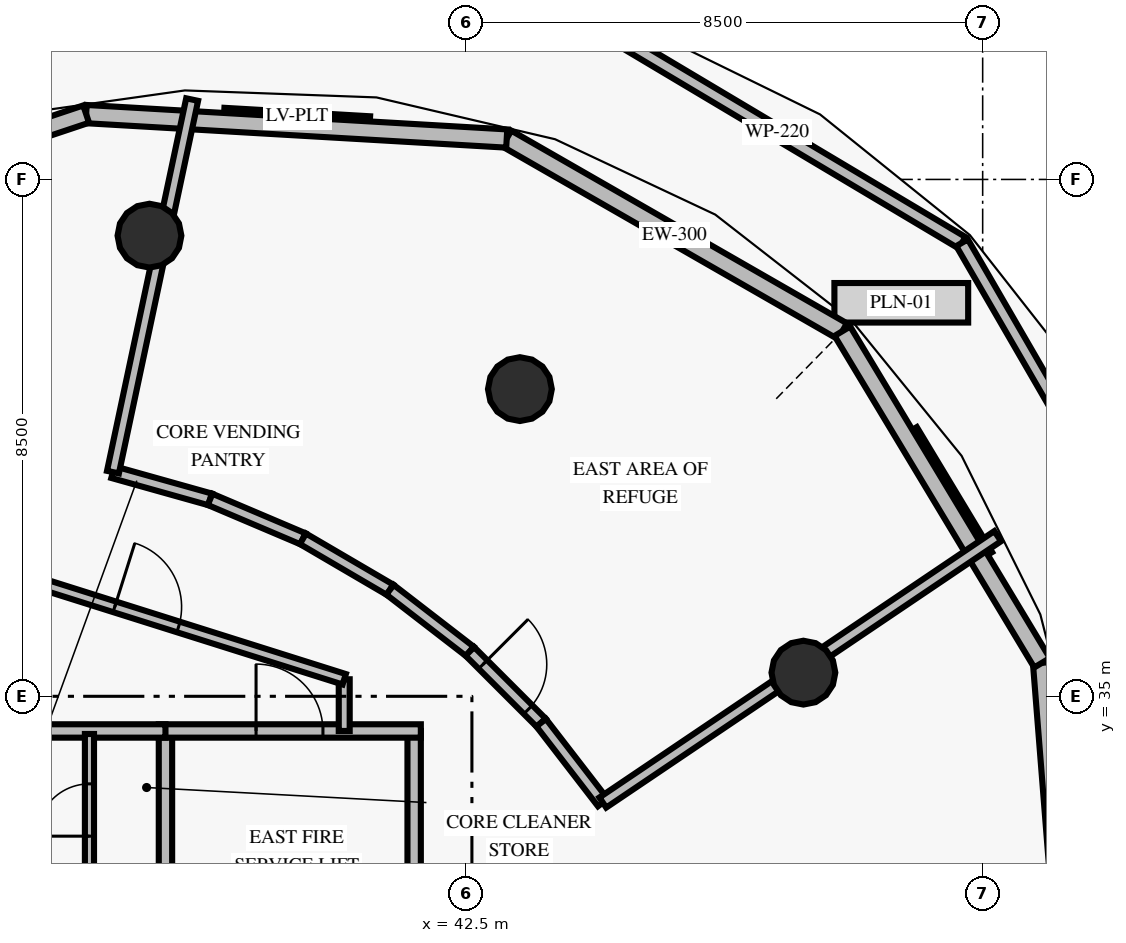
"""IFC4 building model, lengths in metres.
Left out: names, types, materials, properties, quantities, classifications, styles, units other than length and angle.
Written with IfcOpenShell. Run it as: python <this file> out.ifc"""

import sys

from ifc_helpers import new_model, si_unit, direction, frame, frame_2d, origin, origin_2d, place, context, subcontext, project, spatial, rectangle, circle, extrude, element, fill, save


model = new_model("IFC4")
c1 = context("Model", 3, precision=1e-05, world=origin(), true_north=direction((0.0, 1.0)))
c2 = subcontext(c1, "Body", "Model", "MODEL_VIEW")
j1 = project(units=[si_unit("LENGTHUNIT", "METRE"), si_unit("PLANEANGLEUNIT", "RADIAN")], contexts=[c1])
p1 = place(None, origin())
s1 = spatial("IfcSite", under=j1, at=p1, CompositionType="ELEMENT")
p2 = place(p1, origin())
s2 = spatial("IfcBuilding", under=s1, at=p2, CompositionType="ELEMENT")
p3 = place(p2, frame((0.0, 0.0, 220.4)))
s3 = spatial("IfcBuildingStorey", under=s2, at=p3, CompositionType="ELEMENT", Elevation=220.4)
for number, where, z_axis, x_axis in (
    (1, (48.052, 35.389, 0.0), (0.0, 0.0, 1.0), (1.0, 0.0, 0.0)),
    (2, (43.389, 40.052, 0.0), (0.0, 0.0, 1.0), (1.0, 0.0, 0.0)),
    (3, (37.297, 42.575, 0.0), (0.0, 0.0, 1.0), (1.0, 0.0, 0.0)),
):
    element("IfcColumn", number, at=place(p3, frame(where, z_axis=z_axis, x_axis=x_axis)), inside=s3, PredefinedType="COLUMN", context=c2, shape_type="SweptSolid", body=[
        extrude(circle(Radius=0.525, at=origin_2d()), origin(), (0.0, 0.0, 1.0), 5.0),
    ])
p4 = place(p3, frame((50.661, 42.459, 0.0), z_axis=(0.0, 0.0, 1.0), x_axis=(-0.859169548372, 0.511691007494, 0.0)))
e4 = element("IfcWall", 4, at=p4, inside=s3, PredefinedType="PARAPET", context=c2, shape_type="SweptSolid", body=[
    extrude(rectangle(XDim=7.086, YDim=0.22, at=frame_2d((3.543, 0.0))), origin(), (0.0, 0.0, 1.0), 1.2),
])
p5 = place(p3, frame((36.876, 46.653, 0.0), z_axis=(0.0, 0.0, 1.0), x_axis=(-0.953341950879, -0.301892571445, 0.0)))
e5 = element("IfcWall", 5, at=p5, inside=s3, PredefinedType="PARAPET", context=c2, shape_type="SweptSolid", body=[
    extrude(rectangle(XDim=8.533, YDim=0.22, at=frame_2d((4.267, 0.0))), origin(), (0.0, 0.0, 1.0), 1.2),
])
p6 = place(p3, frame((54.212, 36.327, 0.0), z_axis=(0.0, 0.0, 1.0), x_axis=(-0.50115850473, 0.865355506793, 0.0)))
e6 = element("IfcWall", 6, at=p6, inside=s3, PredefinedType="PARAPET", context=c2, shape_type="SweptSolid", body=[
    extrude(rectangle(XDim=7.086, YDim=0.22, at=frame_2d((3.543, 0.0))), origin(), (0.0, 0.0, 1.0), 1.2),
])
p7 = place(p3, frame((48.693, 41.004, 0.0), z_axis=(0.0, 0.0, 1.0), x_axis=(-0.867276097865, 0.497827450099, 0.0)))
e7 = element("IfcWall", 7, at=p7, inside=s3, PredefinedType="SOLIDWALL", context=c2, shape_type="SweptSolid", body=[
    extrude(rectangle(XDim=6.365, YDim=0.3, at=frame_2d((3.183, 0.0))), origin(), (0.0, 0.0, 1.0), 3.96),
])
p8 = place(p3, frame((43.173, 44.173, 0.0), z_axis=(0.0, 0.0, 1.0), x_axis=(-0.998314597189, 0.058034171311, 0.0)))
e8 = element("IfcWall", 8, at=p8, inside=s3, PredefinedType="SOLIDWALL", context=c2, shape_type="SweptSolid", body=[
    extrude(rectangle(XDim=6.929, YDim=0.3, at=frame_2d((3.464, 0.0))), origin(), (0.0, 0.0, 1.0), 3.96),
])
p9 = place(p3, frame((36.256, 44.575, 0.0), z_axis=(0.0, 0.0, 1.0), x_axis=(-0.948459804555, -0.316897458405, 0.0)))
e9 = element("IfcWall", 9, at=p9, inside=s3, PredefinedType="SOLIDWALL", context=c2, shape_type="SweptSolid", body=[
    extrude(rectangle(XDim=7.655, YDim=0.3, at=frame_2d((3.827, 0.0))), origin(), (0.0, 0.0, 1.0), 3.96),
])
p10 = place(p3, frame((52.523, 28.644, 0.0), z_axis=(0.0, 0.0, 1.0), x_axis=(-0.078895085656, 0.99688292465, 0.0)))
e10 = element("IfcWall", 10, at=p10, inside=s3, PredefinedType="SOLIDWALL", context=c2, shape_type="SweptSolid", body=[
    extrude(rectangle(XDim=6.928, YDim=0.3, at=frame_2d((3.464, 0.0))), origin(), (0.0, 0.0, 1.0), 3.96),
])
p11 = place(p3, frame((51.977, 35.551, 0.0), z_axis=(0.0, 0.0, 1.0), x_axis=(-0.515877001429, 0.856662663711, 0.0)))
e11 = element("IfcWall", 11, at=p11, inside=s3, PredefinedType="SOLIDWALL", context=c2, shape_type="SweptSolid", body=[
    extrude(rectangle(XDim=6.365, YDim=0.3, at=frame_2d((3.183, 0.0))), origin(), (0.0, 0.0, 1.0), 3.96),
])
p12 = place(p3, frame((37.56, 30.05, 0.0), z_axis=(0.0, 0.0, 1.0), x_axis=(0.0, 1.0, 0.0)))
e12 = element("IfcWall", 12, at=p12, inside=s3, PredefinedType="SOLIDWALL", context=c2, shape_type="SweptSolid", body=[
    extrude(rectangle(XDim=4.38, YDim=0.22, at=frame_2d((2.19, 0.0))), origin(), (0.0, 0.0, 1.0), 2.8),
])
p13 = place(p12, frame((0.8, 0.0, 0.0)))
e13 = element("IfcOpeningElement", 13, at=p13, cuts=e12, PredefinedType="OPENING", context=c2, shape_type="SweptSolid", body=[
    extrude(rectangle(XDim=1.05, YDim=2.1, at=frame_2d((0.525, 1.05))), frame((0.0, 0.12, 0.0), z_axis=(0.0, -1.0, 0.0), x_axis=(1.0, 0.0, 0.0)), (0.0, 0.0, 1.0), 0.24),
])
p14 = place(p3, frame((41.65, 30.05, 0.0), z_axis=(0.0, 0.0, 1.0), x_axis=(0.0, 1.0, 0.0)))
e14 = element("IfcWall", 14, at=p14, inside=s3, PredefinedType="SOLIDWALL", context=c2, shape_type="SweptSolid", body=[
    extrude(rectangle(XDim=4.38, YDim=0.22, at=frame_2d((2.19, 0.0))), origin(), (0.0, 0.0, 1.0), 2.8),
])
p15 = place(p3, frame((37.45, 34.43, 0.0), z_axis=(0.0, 0.0, 1.0), x_axis=(1.0, 0.0, 0.0)))
e15 = element("IfcWall", 15, at=p15, inside=s3, PredefinedType="SOLIDWALL", context=c2, shape_type="SweptSolid", body=[
    extrude(rectangle(XDim=4.31, YDim=0.22, at=frame_2d((2.155, 0.0))), origin(), (0.0, 0.0, 1.0), 2.8),
])
p16 = place(p15, frame((1.6, 0.0, 0.0)))
e16 = element("IfcOpeningElement", 16, at=p16, cuts=e15, PredefinedType="OPENING", context=c2, shape_type="SweptSolid", body=[
    extrude(rectangle(XDim=1.1, YDim=2.15, at=frame_2d((0.55, 1.075))), frame((0.0, 0.12, 0.0), z_axis=(0.0, -1.0, 0.0), x_axis=(1.0, 0.0, 0.0)), (0.0, 0.0, 1.0), 0.24),
])
p17 = place(p3, frame((30.44, 34.43, 0.0), z_axis=(0.0, 0.0, 1.0), x_axis=(1.0, 0.0, 0.0)))
e17 = element("IfcWall", 17, at=p17, inside=s3, PredefinedType="SOLIDWALL", context=c2, shape_type="SweptSolid", body=[
    extrude(rectangle(XDim=7.12, YDim=0.22, at=frame_2d((3.56, 0.0))), origin(), (0.0, 0.0, 1.0), 2.8),
])
p18 = place(p17, frame((3.01, 0.0, 0.0)))
e18 = element("IfcOpeningElement", 18, at=p18, cuts=e17, PredefinedType="OPENING", context=c2, shape_type="SweptSolid", body=[
    extrude(rectangle(XDim=1.1, YDim=2.15, at=frame_2d((0.55, 1.075))), frame((0.0, 0.12, 0.0), z_axis=(0.0, -1.0, 0.0), x_axis=(1.0, 0.0, 0.0)), (0.0, 0.0, 1.0), 0.24),
])
p19 = place(p3, frame((36.31, 32.05, 0.0), z_axis=(0.0, 0.0, 1.0), x_axis=(0.0, 1.0, 0.0)))
e19 = element("IfcWall", 19, at=p19, inside=s3, PredefinedType="PARTITIONING", context=c2, shape_type="SweptSolid", body=[
    extrude(rectangle(XDim=2.33, YDim=0.15, at=frame_2d((1.165, 0.0))), origin(), (0.0, 0.0, 1.0), 2.8),
])
p20 = place(p19, frame((0.65, 0.0, 0.0)))
e20 = element("IfcOpeningElement", 20, at=p20, cuts=e19, PredefinedType="OPENING", context=c2, shape_type="SweptSolid", body=[
    extrude(rectangle(XDim=0.86, YDim=2.05, at=frame_2d((0.43, 1.025))), frame((0.0, 0.085, 0.0), z_axis=(0.0, -1.0, 0.0), x_axis=(1.0, 0.0, 0.0)), (0.0, 0.0, 1.0), 0.17),
])
p21 = place(p3, frame((40.5, 35.28, 0.0), z_axis=(0.0, 0.0, 1.0), x_axis=(0.0, -1.0, 0.0)))
e21 = element("IfcWall", 21, at=p21, inside=s3, PredefinedType="PARTITIONING", context=c2, shape_type="SweptSolid", body=[
    extrude(rectangle(XDim=0.85, YDim=0.18, at=frame_2d((0.425, 0.0))), origin(), (0.0, 0.0, 1.0), 2.8),
])
p22 = place(p3, frame((34.0, 37.33, 0.0), z_axis=(0.0, 0.0, 1.0), x_axis=(0.953691418528, -0.300786765376, 0.0)))
e22 = element("IfcWall", 22, at=p22, inside=s3, PredefinedType="PARTITIONING", context=c2, shape_type="SweptSolid", body=[
    extrude(rectangle(XDim=6.816, YDim=0.18, at=frame_2d((3.408, 0.0))), origin(), (0.0, 0.0, 1.0), 2.8),
])
p23 = place(p22, frame((2.858, 0.0, 0.0)))
e23 = element("IfcOpeningElement", 23, at=p23, cuts=e22, PredefinedType="OPENING", context=c2, shape_type="SweptSolid", body=[
    extrude(rectangle(XDim=1.1, YDim=2.15, at=frame_2d((0.55, 1.075))), frame((0.0, 0.1, 0.0), z_axis=(0.0, -1.0, 0.0), x_axis=(1.0, 0.0, 0.0)), (0.0, 0.0, 1.0), 0.2),
])
p24 = place(p3, frame((36.697, 38.687, 0.0), z_axis=(0.0, 0.0, 1.0), x_axis=(0.962850837775, -0.270033820467, 0.0)))
e24 = element("IfcWall", 24, at=p24, inside=s3, PredefinedType="SOLIDWALL", context=c2, shape_type="SweptSolid", body=[
    extrude(rectangle(XDim=1.659, YDim=0.2, at=frame_2d((0.83, 0.0))), origin(), (0.0, 0.0, 1.0), 2.8),
])
p25 = place(p3, frame((38.294, 38.239, 0.0), z_axis=(0.0, 0.0, 1.0), x_axis=(0.920487144923, -0.390772844543, 0.0)))
e25 = element("IfcWall", 25, at=p25, inside=s3, PredefinedType="SOLIDWALL", context=c2, shape_type="SweptSolid", body=[
    extrude(rectangle(XDim=1.659, YDim=0.2, at=frame_2d((0.829, 0.0))), origin(), (0.0, 0.0, 1.0), 2.8),
])
for number, where, z_axis, x_axis in (
    (26, (39.821, 37.59, 0.0), (0.0, 0.0, 1.0), (0.863, -0.505, 0.0)),
    (27, (41.253, 36.753, 0.0), (0.0, 0.0, 1.0), (0.792, -0.611, 0.0)),
):
    element("IfcWall", number, at=place(p3, frame(where, z_axis=z_axis, x_axis=x_axis)), inside=s3, PredefinedType="SOLIDWALL", context=c2, shape_type="SweptSolid", body=[
        extrude(rectangle(XDim=1.659, YDim=0.2, at=frame_2d((0.83, 0.0))), origin(), (0.0, 0.0, 1.0), 2.8),
    ])
p26 = place(p3, frame((42.566, 35.739, 0.0), z_axis=(0.0, 0.0, 1.0), x_axis=(0.707106781187, -0.707106781187, 0.0)))
e28 = element("IfcWall", 28, at=p26, inside=s3, PredefinedType="SOLIDWALL", context=c2, shape_type="SweptSolid", body=[
    extrude(rectangle(XDim=1.659, YDim=0.2, at=frame_2d((0.83, 0.0))), origin(), (0.0, 0.0, 1.0), 2.8),
])
p27 = place(p26, frame((0.304, 0.0, 0.0)))
e29 = element("IfcOpeningElement", 29, at=p27, cuts=e28, PredefinedType="OPENING", context=c2, shape_type="SweptSolid", body=[
    extrude(rectangle(XDim=1.05, YDim=2.15, at=frame_2d((0.525, 1.075))), frame((0.0, 0.11, 0.0), z_axis=(0.0, -1.0, 0.0), x_axis=(1.0, 0.0, 0.0)), (0.0, 0.0, 1.0), 0.22),
])
p28 = place(p3, frame((43.739, 34.566, 0.0), z_axis=(0.0, 0.0, 1.0), x_axis=(0.611032763433, -0.791605306962, 0.0)))
e30 = element("IfcWall", 30, at=p28, inside=s3, PredefinedType="SOLIDWALL", context=c2, shape_type="SweptSolid", body=[
    extrude(rectangle(XDim=1.659, YDim=0.2, at=frame_2d((0.83, 0.0))), origin(), (0.0, 0.0, 1.0), 2.8),
])
p29 = place(p3, frame((44.753, 33.253, 0.0), z_axis=(0.0, 0.0, 1.0), x_axis=(0.829027106194, 0.559208420177, 0.0)))
e31 = element("IfcWall", 31, at=p29, inside=s3, PredefinedType="SOLIDWALL", context=c2, shape_type="SweptSolid", body=[
    extrude(rectangle(XDim=7.834, YDim=0.2, at=frame_2d((3.917, 0.0))), origin(), (0.0, 0.0, 1.0), 2.8),
])
p30 = place(p3, frame((36.697, 38.687, 0.0), z_axis=(0.0, 0.0, 1.0), x_axis=(0.207899777226, 0.97815013297, 0.0)))
e32 = element("IfcWall", 32, at=p30, inside=s3, PredefinedType="SOLIDWALL", context=c2, shape_type="SweptSolid", body=[
    extrude(rectangle(XDim=6.264, YDim=0.2, at=frame_2d((3.132, 0.0))), origin(), (0.0, 0.0, 1.0), 2.8),
])
p31 = place(p16, origin())
e33 = element("IfcDoor", 33, at=p31, inside=s3, OperationType="SINGLE_SWING_LEFT", PredefinedType="DOOR", context=c2, shape_type="SweptSolid", body=[
    extrude(rectangle(XDim=1.1, YDim=2.15, at=frame_2d((0.55, 1.075))), frame((0.0, 0.025, 0.0), z_axis=(0.0, -1.0, 0.0), x_axis=(1.0, 0.0, 0.0)), (0.0, 0.0, 1.0), 0.05),
])
fill(e16, e33)
p32 = place(p20, origin())
e34 = element("IfcDoor", 34, at=p32, inside=s3, OperationType="SINGLE_SWING_LEFT", PredefinedType="TRAPDOOR", context=c2, shape_type="SweptSolid", body=[
    extrude(rectangle(XDim=0.86, YDim=2.05, at=frame_2d((0.43, 1.025))), frame((0.0, 0.025, 0.0), z_axis=(0.0, -1.0, 0.0), x_axis=(1.0, 0.0, 0.0)), (0.0, 0.0, 1.0), 0.05),
])
fill(e20, e34)
p33 = place(p23, origin())
e35 = element("IfcDoor", 35, at=p33, inside=s3, OperationType="SINGLE_SWING_LEFT", PredefinedType="DOOR", context=c2, shape_type="SweptSolid", body=[
    extrude(rectangle(XDim=1.1, YDim=2.15, at=frame_2d((0.55, 1.075))), frame((0.0, 0.025, 0.0), z_axis=(0.0, -1.0, 0.0), x_axis=(1.0, 0.0, 0.0)), (0.0, 0.0, 1.0), 0.05),
])
fill(e23, e35)
p34 = place(p27, origin())
e36 = element("IfcDoor", 36, at=p34, inside=s3, OperationType="SINGLE_SWING_LEFT", PredefinedType="DOOR", context=c2, shape_type="SweptSolid", body=[
    extrude(rectangle(XDim=1.05, YDim=2.15, at=frame_2d((0.525, 1.075))), frame((0.0, 0.025, 0.0), z_axis=(0.0, -1.0, 0.0), x_axis=(1.0, 0.0, 0.0)), (0.0, 0.0, 1.0), 0.05),
])
fill(e29, e36)
save(model, sys.argv[1])
